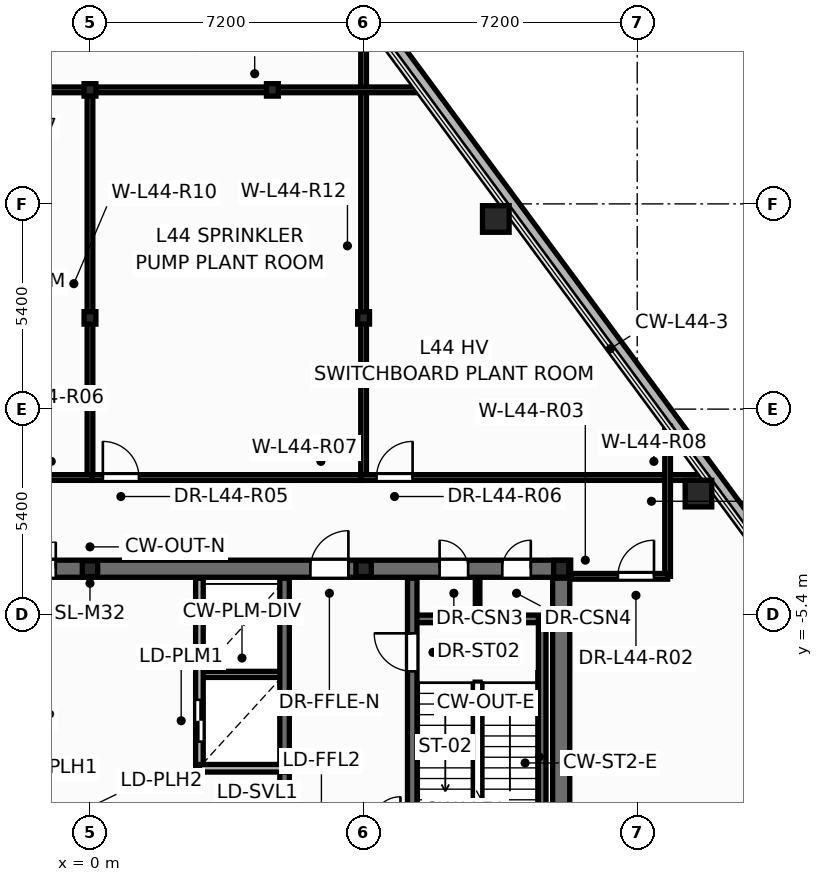
"""IFC4 building model, lengths in metres.
Left out: names, types, materials, properties, quantities, classifications, styles, units other than length and angle.
Written with IfcOpenShell. Run it as: python <this file> out.ifc"""

import sys

from ifc_helpers import new_model, si_unit, direction, frame, frame_2d, origin, origin_2d, place, context, subcontext, project, spatial, rectangle, hollow_circle, i_section, extrude, element, fill, save


model = new_model("IFC4")
c1 = context("Model", 3, precision=1e-05, world=origin(), true_north=direction((0.0, 1.0)))
c2 = subcontext(c1, "Body", "Model", "MODEL_VIEW")
j1 = project(units=[si_unit("LENGTHUNIT", "METRE"), si_unit("PLANEANGLEUNIT", "RADIAN")], contexts=[c1])
p1 = place(None, origin())
s1 = spatial("IfcSite", under=j1, at=p1, CompositionType="ELEMENT")
p2 = place(p1, origin())
s2 = spatial("IfcBuilding", under=s1, at=p2, CompositionType="ELEMENT")
p3 = place(p2, frame((0.0, 0.0, 168.9)))
s3 = spatial("IfcBuildingStorey", under=s2, at=p3, CompositionType="ELEMENT", Elevation=168.9)
for number, where, z_axis, x_axis in (
    (1, (16.012, -2.223, 0.0), (0.0, 0.0, 1.0), (1.0, 0.0, 0.0)),
    (2, (10.679, 5.003, 0.0), (0.0, 0.0, 1.0), (1.0, 0.0, 0.0)),
):
    element("IfcColumn", number, at=place(p3, frame(where, z_axis=z_axis, x_axis=x_axis)), inside=s3, PredefinedType="COLUMN", context=c2, shape_type="SweptSolid", body=[
        extrude(hollow_circle(Radius=0.35, WallThickness=0.03, at=origin_2d()), origin(), (0.0, 0.0, 1.0), 4.8),
    ])
p4 = place(p3, frame((12.4, -4.2, 0.0), z_axis=(0.0, 0.0, 1.0), x_axis=(1.0, 0.0, 0.0)))
e3 = element("IfcColumn", 3, at=p4, inside=s3, PredefinedType="COLUMN", context=c2, shape_type="SweptSolid", body=[
    extrude(i_section(OverallWidth=0.4, OverallDepth=0.44, WebThickness=0.028, FlangeThickness=0.04, at=origin_2d()), origin(), (0.0, 0.0, 1.0), 4.8),
])
for number, where, z_axis, x_axis in (
    (4, (0.0, -4.2, 0.0), (0.0, 0.0, 1.0), (1.0, 0.0, 0.0)),
    (5, (7.2, -4.2, 0.0), (0.0, 0.0, 1.0), (1.0, 0.0, 0.0)),
):
    element("IfcColumn", number, at=place(p3, frame(where, z_axis=z_axis, x_axis=x_axis)), inside=s3, PredefinedType="PILASTER", context=c2, shape_type="SweptSolid", body=[
        extrude(i_section(OverallWidth=0.405, OverallDepth=0.414, WebThickness=0.022, FlangeThickness=0.032, at=origin_2d()), origin(), (0.0, 0.0, 1.0), 4.8),
    ])
for number, where, z_axis, x_axis in (
    (6, (0.0, 2.4, 0.0), (0.0, 0.0, 1.0), (1.0, 0.0, 0.0)),
    (7, (7.2, 2.4, 0.0), (0.0, 0.0, 1.0), (1.0, 0.0, 0.0)),
    (8, (0.0, 8.4, 0.0), (0.0, 0.0, 1.0), (1.0, 0.0, 0.0)),
    (9, (4.8, 8.4, 0.0), (0.0, 0.0, 1.0), (1.0, 0.0, 0.0)),
):
    element("IfcColumn", number, at=place(p3, frame(where, z_axis=z_axis, x_axis=x_axis)), inside=s3, PredefinedType="COLUMN", context=c2, shape_type="SweptSolid", body=[
        extrude(i_section(OverallWidth=0.311, OverallDepth=0.327, WebThickness=0.016, FlangeThickness=0.025, at=origin_2d()), origin(), (0.0, 0.0, 1.0), 4.8),
    ])
p5 = place(p3, frame((22.812, -10.495, -0.2), z_axis=(0.0, 0.0, 1.0), x_axis=(-0.593788907914, 0.804620862791, 0.0)))
e10 = element("IfcWall", 10, at=p5, inside=s3, PredefinedType="PARAPET", context=c2, shape_type="SweptSolid", body=[
    extrude(rectangle(XDim=30.276, YDim=0.36, at=frame_2d((15.138, 0.0))), origin(), (0.0, 0.0, 1.0), 0.38),
])
p6 = place(p3, frame((2.88, -6.98, 0.0), z_axis=(0.0, 0.0, 1.0), x_axis=(1.0, 0.0, 0.0)))
e11 = element("IfcWall", 11, at=p6, inside=s3, PredefinedType="PARTITIONING", context=c2, shape_type="SweptSolid", body=[
    extrude(rectangle(XDim=2.24, YDim=0.16, at=frame_2d((1.12, 0.0))), origin(), (0.0, 0.0, 1.0), 4.52),
])
p7 = place(p3, frame((10.2, -5.52, 0.0), z_axis=(0.0, 0.0, 1.0), x_axis=(0.0, 1.0, 0.0)))
e12 = element("IfcWall", 12, at=p7, inside=s3, PredefinedType="PARTITIONING", context=c2, shape_type="SweptSolid", body=[
    extrude(rectangle(XDim=1.12, YDim=0.12, at=frame_2d((0.56, 0.0))), origin(), (0.0, 0.0, 1.0), 4.52),
])
p8 = place(p3, frame((-12.65, -4.2, 0.0), z_axis=(0.0, 0.0, 1.0), x_axis=(1.0, 0.0, 0.0)))
e13 = element("IfcWall", 13, at=p8, inside=s3, PredefinedType="SHEAR", context=c2, shape_type="SweptSolid", body=[
    extrude(rectangle(XDim=25.3, YDim=0.45, at=frame_2d((12.65, 0.0))), origin(), (0.0, 0.0, 1.0), 4.8),
])
p9 = place(p8, frame((0.95, 0.0, 0.0)))
e14 = element("IfcOpeningElement", 14, at=p9, cuts=e13, PredefinedType="OPENING", context=c2, shape_type="SweptSolid", body=[
    extrude(rectangle(XDim=0.756, YDim=2.054, at=frame_2d((0.375, 1.027))), frame((0.0, 0.235, 0.0), z_axis=(0.0, -1.0, 0.0), x_axis=(1.0, 0.0, 0.0)), (0.0, 0.0, 1.0), 0.47),
])
p10 = place(p8, frame((2.6, 0.0, 0.0)))
e15 = element("IfcOpeningElement", 15, at=p10, cuts=e13, PredefinedType="OPENING", context=c2, shape_type="SweptSolid", body=[
    extrude(rectangle(XDim=0.756, YDim=2.054, at=frame_2d((0.375, 1.027))), frame((0.0, 0.235, 0.0), z_axis=(0.0, -1.0, 0.0), x_axis=(1.0, 0.0, 0.0)), (0.0, 0.0, 1.0), 0.47),
])
p11 = place(p8, frame((21.85, 0.0, 0.0)))
e16 = element("IfcOpeningElement", 16, at=p11, cuts=e13, PredefinedType="OPENING", context=c2, shape_type="SweptSolid", body=[
    extrude(rectangle(XDim=0.756, YDim=2.054, at=frame_2d((0.375, 1.027))), frame((0.0, 0.235, 0.0), z_axis=(0.0, -1.0, 0.0), x_axis=(1.0, 0.0, 0.0)), (0.0, 0.0, 1.0), 0.47),
])
p12 = place(p8, frame((23.5, 0.0, 0.0)))
e17 = element("IfcOpeningElement", 17, at=p12, cuts=e13, PredefinedType="OPENING", context=c2, shape_type="SweptSolid", body=[
    extrude(rectangle(XDim=0.756, YDim=2.054, at=frame_2d((0.375, 1.027))), frame((0.0, 0.235, 0.0), z_axis=(0.0, -1.0, 0.0), x_axis=(1.0, 0.0, 0.0)), (0.0, 0.0, 1.0), 0.47),
])
p13 = place(p8, frame((5.85, 0.0, 0.0)))
e18 = element("IfcOpeningElement", 18, at=p13, cuts=e13, PredefinedType="OPENING", context=c2, shape_type="SweptSolid", body=[
    extrude(rectangle(XDim=1.006, YDim=2.104, at=frame_2d((0.5, 1.052))), frame((0.0, 0.235, 0.0), z_axis=(0.0, -1.0, 0.0), x_axis=(1.0, 0.0, 0.0)), (0.0, 0.0, 1.0), 0.47),
])
p14 = place(p8, frame((10.35, 0.0, 0.0)))
e19 = element("IfcOpeningElement", 19, at=p14, cuts=e13, PredefinedType="OPENING", context=c2, shape_type="SweptSolid", body=[
    extrude(rectangle(XDim=1.406, YDim=2.154, at=frame_2d((0.7, 1.077))), frame((0.0, 0.235, 0.0), z_axis=(0.0, -1.0, 0.0), x_axis=(1.0, 0.0, 0.0)), (0.0, 0.0, 1.0), 0.47),
])
p15 = place(p8, frame((18.45, 0.0, 0.0)))
e20 = element("IfcOpeningElement", 20, at=p15, cuts=e13, PredefinedType="OPENING", context=c2, shape_type="SweptSolid", body=[
    extrude(rectangle(XDim=1.006, YDim=2.104, at=frame_2d((0.5, 1.052))), frame((0.0, 0.235, 0.0), z_axis=(0.0, -1.0, 0.0), x_axis=(1.0, 0.0, 0.0)), (0.0, 0.0, 1.0), 0.47),
])
p16 = place(p3, frame((8.48, -5.52, 0.0), z_axis=(0.0, 0.0, 1.0), x_axis=(1.0, 0.0, 0.0)))
e21 = element("IfcWall", 21, at=p16, inside=s3, PredefinedType="SOLIDWALL", context=c2, shape_type="SweptSolid", body=[
    extrude(rectangle(XDim=3.87, YDim=0.2, at=frame_2d((1.935, 0.0))), origin(), (0.0, 0.0, 1.0), 4.8),
])
p17 = place(p3, frame((11.9, -13.1, 0.0), z_axis=(0.0, 0.0, 1.0), x_axis=(0.0, 1.0, 0.0)))
e22 = element("IfcWall", 22, at=p17, inside=s3, PredefinedType="SOLIDWALL", context=c2, shape_type="SweptSolid", body=[
    extrude(rectangle(XDim=7.58, YDim=0.2, at=frame_2d((3.79, 0.0))), origin(), (0.0, 0.0, 1.0), 4.8),
])
p18 = place(p3, frame((8.48, -13.85, 0.0), z_axis=(0.0, 0.0, 1.0), x_axis=(0.0, 1.0, 0.0)))
e23 = element("IfcWall", 23, at=p18, inside=s3, PredefinedType="SHEAR", context=c2, shape_type="SweptSolid", body=[
    extrude(rectangle(XDim=9.4, YDim=0.25, at=frame_2d((4.7, 0.0))), origin(), (0.0, 0.0, 1.0), 4.8),
])
p19 = place(p18, frame((6.95, 0.0, 0.0)))
e24 = element("IfcOpeningElement", 24, at=p19, cuts=e23, PredefinedType="OPENING", context=c2, shape_type="SweptSolid", body=[
    extrude(rectangle(XDim=1.006, YDim=2.104, at=frame_2d((0.5, 1.052))), frame((0.0, 0.135, 0.0), z_axis=(0.0, -1.0, 0.0), x_axis=(1.0, 0.0, 0.0)), (0.0, 0.0, 1.0), 0.27),
])
p20 = place(p3, frame((5.12, -13.85, 0.0), z_axis=(0.0, 0.0, 1.0), x_axis=(0.0, 1.0, 0.0)))
e25 = element("IfcWall", 25, at=p20, inside=s3, PredefinedType="SHEAR", context=c2, shape_type="SweptSolid", body=[
    extrude(rectangle(XDim=9.4, YDim=0.25, at=frame_2d((4.7, 0.0))), origin(), (0.0, 0.0, 1.0), 4.8),
])
p21 = place(p3, frame((12.4, -13.85, 0.0), z_axis=(0.0, 0.0, 1.0), x_axis=(0.0, 1.0, 0.0)))
e26 = element("IfcWall", 26, at=p21, inside=s3, PredefinedType="SHEAR", context=c2, shape_type="SweptSolid", body=[
    extrude(rectangle(XDim=9.4, YDim=0.45, at=frame_2d((4.7, 0.0))), origin(), (0.0, 0.0, 1.0), 4.8),
])
p22 = place(p3, frame((2.88, -9.45, 0.0), z_axis=(0.0, 0.0, 1.0), x_axis=(0.0, 1.0, 0.0)))
e27 = element("IfcWall", 27, at=p22, inside=s3, PredefinedType="SOLIDWALL", context=c2, shape_type="SweptSolid", body=[
    extrude(rectangle(XDim=5.0, YDim=0.2, at=frame_2d((2.5, 0.0))), origin(), (0.0, 0.0, 1.0), 4.52),
])
p23 = place(p22, frame((0.7, 0.0, 0.0)))
e28 = element("IfcOpeningElement", 28, at=p23, cuts=e27, PredefinedType="OPENING", context=c2, shape_type="SweptSolid", body=[
    extrude(rectangle(XDim=1.106, YDim=2.104, at=frame_2d((0.55, 1.052))), frame((0.0, 0.11, 0.0), z_axis=(0.0, -1.0, 0.0), x_axis=(1.0, 0.0, 0.0)), (0.0, 0.0, 1.0), 0.22),
])
p24 = place(p3, frame((2.88, -9.45, 0.0), z_axis=(0.0, 0.0, 1.0), x_axis=(1.0, 0.0, 0.0)))
e29 = element("IfcWall", 29, at=p24, inside=s3, PredefinedType="SOLIDWALL", context=c2, shape_type="SweptSolid", body=[
    extrude(rectangle(XDim=2.24, YDim=0.2, at=frame_2d((1.12, 0.0))), origin(), (0.0, 0.0, 1.0), 4.52),
])
p25 = place(p3, frame((7.2, -1.8, 0.0), z_axis=(0.0, 0.0, 1.0), x_axis=(0.0, 1.0, 0.0)))
e30 = element("IfcWall", 30, at=p25, inside=s3, PredefinedType="PARTITIONING", context=c2, shape_type="SweptSolid", body=[
    extrude(rectangle(XDim=12.191, YDim=0.15, at=frame_2d((6.096, 0.0))), origin(), (0.0, 0.0, 1.0), 2.485),
])
p26 = place(p3, frame((0.0, -1.8, 0.0), z_axis=(0.0, 0.0, 1.0), x_axis=(0.0, 1.0, 0.0)))
e31 = element("IfcWall", 31, at=p26, inside=s3, PredefinedType="PARTITIONING", context=c2, shape_type="SweptSolid", body=[
    extrude(rectangle(XDim=10.2, YDim=0.15, at=frame_2d((5.1, 0.0))), origin(), (0.0, 0.0, 1.0), 3.495),
])
p27 = place(p3, frame((7.14, -1.8, 0.0), z_axis=(0.0, 0.0, 1.0), x_axis=(1.0, 0.0, 0.0)))
e32 = element("IfcWall", 32, at=p27, inside=s3, PredefinedType="PARTITIONING", context=c2, shape_type="SweptSolid", body=[
    extrude(rectangle(XDim=9.057, YDim=0.15, at=frame_2d((4.529, 0.0))), origin(), (0.0, 0.0, 1.0), 2.485),
])
p28 = place(p27, frame((0.4, 0.0, 0.0)))
e33 = element("IfcOpeningElement", 33, at=p28, cuts=e32, PredefinedType="OPENING", context=c2, shape_type="SweptSolid", body=[
    extrude(rectangle(XDim=0.956, YDim=2.104, at=frame_2d((0.475, 1.052))), frame((0.0, 0.085, 0.0), z_axis=(0.0, -1.0, 0.0), x_axis=(1.0, 0.0, 0.0)), (0.0, 0.0, 1.0), 0.17),
])
p29 = place(p3, frame((-8.67, 8.4, 0.0), z_axis=(0.0, 0.0, 1.0), x_axis=(1.0, 0.0, 0.0)))
e34 = element("IfcWall", 34, at=p29, inside=s3, PredefinedType="PARTITIONING", context=c2, shape_type="SweptSolid", body=[
    extrude(rectangle(XDim=8.67, YDim=0.15, at=frame_2d((4.335, 0.0))), origin(), (0.0, 0.0, 1.0), 2.585),
])
p30 = place(p29, frame((5.809, 0.0, 0.0)))
e35 = element("IfcOpeningElement", 35, at=p30, cuts=e34, PredefinedType="OPENING", context=c2, shape_type="SweptSolid", body=[
    extrude(rectangle(XDim=0.956, YDim=2.104, at=frame_2d((0.475, 1.052))), frame((0.0, 0.085, 0.0), z_axis=(0.0, -1.0, 0.0), x_axis=(1.0, 0.0, 0.0)), (0.0, 0.0, 1.0), 0.17),
])
p31 = place(p3, frame((0.0, 8.4, 0.0), z_axis=(0.0, 0.0, 1.0), x_axis=(1.0, 0.0, 0.0)))
e36 = element("IfcWall", 36, at=p31, inside=s3, PredefinedType="PARTITIONING", context=c2, shape_type="SweptSolid", body=[
    extrude(rectangle(XDim=8.67, YDim=0.15, at=frame_2d((4.335, 0.0))), origin(), (0.0, 0.0, 1.0), 2.585),
])
p32 = place(p3, frame((-7.138, -1.8, 0.0), z_axis=(0.0, 0.0, 1.0), x_axis=(1.0, 0.0, 0.0)))
e37 = element("IfcWall", 37, at=p32, inside=s3, PredefinedType="PARTITIONING", context=c2, shape_type="SweptSolid", body=[
    extrude(rectangle(XDim=7.198, YDim=0.15, at=frame_2d((3.599, 0.0))), origin(), (0.0, 0.0, 1.0), 2.485),
])
p33 = place(p32, frame((0.277, 0.0, 0.0)))
e38 = element("IfcOpeningElement", 38, at=p33, cuts=e37, PredefinedType="OPENING", context=c2, shape_type="SweptSolid", body=[
    extrude(rectangle(XDim=0.956, YDim=2.104, at=frame_2d((0.475, 1.052))), frame((0.0, 0.085, 0.0), z_axis=(0.0, -1.0, 0.0), x_axis=(1.0, 0.0, 0.0)), (0.0, 0.0, 1.0), 0.17),
])
p34 = place(p3, frame((0.062, -1.8, 0.0), z_axis=(0.0, 0.0, 1.0), x_axis=(1.0, 0.0, 0.0)))
e39 = element("IfcWall", 39, at=p34, inside=s3, PredefinedType="PARTITIONING", context=c2, shape_type="SweptSolid", body=[
    extrude(rectangle(XDim=7.076, YDim=0.15, at=frame_2d((3.538, 0.0))), origin(), (0.0, 0.0, 1.0), 2.485),
])
p35 = place(p34, frame((0.277, 0.0, 0.0)))
e40 = element("IfcOpeningElement", 40, at=p35, cuts=e39, PredefinedType="OPENING", context=c2, shape_type="SweptSolid", body=[
    extrude(rectangle(XDim=0.956, YDim=2.104, at=frame_2d((0.475, 1.052))), frame((0.0, 0.085, 0.0), z_axis=(0.0, -1.0, 0.0), x_axis=(1.0, 0.0, 0.0)), (0.0, 0.0, 1.0), 0.17),
])
p36 = place(p3, frame((15.2, -4.4, 0.0), z_axis=(0.0, 0.0, 1.0), x_axis=(0.0, 1.0, 0.0)))
e41 = element("IfcWall", 41, at=p36, inside=s3, PredefinedType="PARTITIONING", context=c2, shape_type="SweptSolid", body=[
    extrude(rectangle(XDim=3.951, YDim=0.15, at=frame_2d((1.975, 0.0))), origin(), (0.0, 0.0, 1.0), 2.485),
])
p37 = place(p3, frame((12.652, -4.4, 0.0), z_axis=(0.0, 0.0, 1.0), x_axis=(1.0, 0.0, 0.0)))
e42 = element("IfcWall", 42, at=p37, inside=s3, PredefinedType="PARTITIONING", context=c2, shape_type="SweptSolid", body=[
    extrude(rectangle(XDim=2.548, YDim=0.15, at=frame_2d((1.274, 0.0))), origin(), (0.0, 0.0, 1.0), 2.485),
])
p38 = place(p37, frame((1.24, 0.0, 0.0)))
e43 = element("IfcOpeningElement", 43, at=p38, cuts=e42, PredefinedType="OPENING", context=c2, shape_type="SweptSolid", body=[
    extrude(rectangle(XDim=0.956, YDim=2.104, at=frame_2d((0.475, 1.052))), frame((0.0, 0.085, 0.0), z_axis=(0.0, -1.0, 0.0), x_axis=(1.0, 0.0, 0.0)), (0.0, 0.0, 1.0), 0.17),
])
p39 = place(p23, origin())
e44 = element("IfcDoor", 44, at=p39, inside=s3, OperationType="DOUBLE_DOOR_SLIDING", PredefinedType="DOOR", context=c2, shape_type="SweptSolid", body=[
    extrude(rectangle(XDim=1.1, YDim=2.1, at=frame_2d((0.55, 1.05))), frame((0.0, 0.025, 0.0), z_axis=(0.0, -1.0, 0.0), x_axis=(1.0, 0.0, 0.0)), (0.0, 0.0, 1.0), 0.05),
])
fill(e28, e44)
p40 = place(p19, origin())
e45 = element("IfcDoor", 45, at=p40, inside=s3, OperationType="SINGLE_SWING_RIGHT", PredefinedType="DOOR", context=c2, shape_type="SweptSolid", body=[
    extrude(rectangle(XDim=1.0, YDim=2.1, at=frame_2d((0.5, 1.05))), frame((0.0, 0.025, 0.0), z_axis=(0.0, -1.0, 0.0), x_axis=(1.0, 0.0, 0.0)), (0.0, 0.0, 1.0), 0.05),
])
fill(e24, e45)
p41 = place(p11, origin())
e46 = element("IfcDoor", 46, at=p41, inside=s3, OperationType="SINGLE_SWING_LEFT", PredefinedType="DOOR", context=c2, shape_type="SweptSolid", body=[
    extrude(rectangle(XDim=0.75, YDim=2.05, at=frame_2d((0.375, 1.025))), frame((0.0, 0.025, 0.0), z_axis=(0.0, -1.0, 0.0), x_axis=(1.0, 0.0, 0.0)), (0.0, 0.0, 1.0), 0.05),
])
fill(e16, e46)
p42 = place(p12, origin())
e47 = element("IfcDoor", 47, at=p42, inside=s3, OperationType="SINGLE_SWING_RIGHT", PredefinedType="DOOR", context=c2, shape_type="SweptSolid", body=[
    extrude(rectangle(XDim=0.75, YDim=2.05, at=frame_2d((0.375, 1.025))), frame((0.0, 0.025, 0.0), z_axis=(0.0, -1.0, 0.0), x_axis=(1.0, 0.0, 0.0)), (0.0, 0.0, 1.0), 0.05),
])
fill(e17, e47)
p43 = place(p14, origin())
e48 = element("IfcDoor", 48, at=p43, inside=s3, OperationType="DOUBLE_DOOR_SINGLE_SWING", PredefinedType="DOOR", context=c2, shape_type="SweptSolid", body=[
    extrude(rectangle(XDim=1.4, YDim=2.15, at=frame_2d((0.7, 1.075))), frame((0.0, 0.025, 0.0), z_axis=(0.0, -1.0, 0.0), x_axis=(1.0, 0.0, 0.0)), (0.0, 0.0, 1.0), 0.05),
])
fill(e19, e48)
p44 = place(p15, origin())
e49 = element("IfcDoor", 49, at=p44, inside=s3, OperationType="SINGLE_SWING_RIGHT", PredefinedType="DOOR", context=c2, shape_type="SweptSolid", body=[
    extrude(rectangle(XDim=1.0, YDim=2.1, at=frame_2d((0.5, 1.05))), frame((0.0, 0.025, 0.0), z_axis=(0.0, -1.0, 0.0), x_axis=(1.0, 0.0, 0.0)), (0.0, 0.0, 1.0), 0.05),
])
fill(e20, e49)
p45 = place(p38, origin())
e50 = element("IfcDoor", 50, at=p45, inside=s3, OperationType="SINGLE_SWING_RIGHT", PredefinedType="DOOR", context=c2, shape_type="SweptSolid", body=[
    extrude(rectangle(XDim=0.95, YDim=2.1, at=frame_2d((0.475, 1.05))), frame((0.0, 0.025, 0.0), z_axis=(0.0, -1.0, 0.0), x_axis=(1.0, 0.0, 0.0)), (0.0, 0.0, 1.0), 0.05),
])
fill(e43, e50)
p46 = place(p35, origin())
e51 = element("IfcDoor", 51, at=p46, inside=s3, OperationType="SINGLE_SWING_LEFT", PredefinedType="DOOR", context=c2, shape_type="SweptSolid", body=[
    extrude(rectangle(XDim=0.95, YDim=2.1, at=frame_2d((0.475, 1.05))), frame((0.0, 0.025, 0.0), z_axis=(0.0, -1.0, 0.0), x_axis=(1.0, 0.0, 0.0)), (0.0, 0.0, 1.0), 0.05),
])
fill(e40, e51)
p47 = place(p28, origin())
e52 = element("IfcDoor", 52, at=p47, inside=s3, OperationType="SINGLE_SWING_RIGHT", PredefinedType="DOOR", context=c2, shape_type="SweptSolid", body=[
    extrude(rectangle(XDim=0.95, YDim=2.1, at=frame_2d((0.475, 1.05))), frame((0.0, 0.025, 0.0), z_axis=(0.0, -1.0, 0.0), x_axis=(1.0, 0.0, 0.0)), (0.0, 0.0, 1.0), 0.05),
])
fill(e33, e52)
save(model, sys.argv[1])
